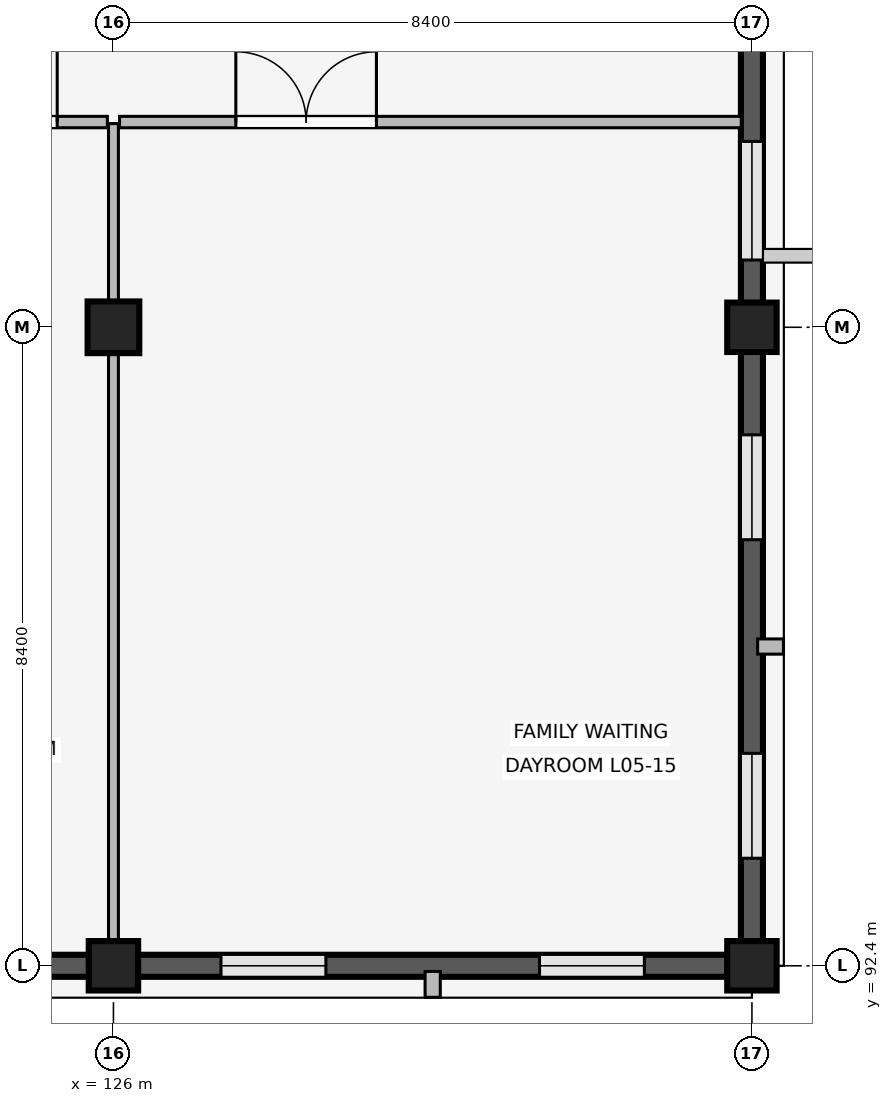
"""IFC4 building model, lengths in metres.
Left out: names, types, materials, properties, quantities, classifications, styles, units other than length and angle.
Written with IfcOpenShell. Run it as: python <this file> out.ifc"""

import sys

from ifc_helpers import new_model, si_unit, direction, frame, frame_2d, origin, origin_2d, place, context, subcontext, project, spatial, rectangle, extrude, element, fill, save


model = new_model("IFC4")
c1 = context("Model", 3, precision=1e-05, world=origin(), true_north=direction((0.0, 1.0)))
c2 = subcontext(c1, "Body", "Model", "MODEL_VIEW")
j1 = project(units=[si_unit("LENGTHUNIT", "METRE"), si_unit("PLANEANGLEUNIT", "RADIAN")], contexts=[c1])
p1 = place(None, origin())
s1 = spatial("IfcSite", under=j1, at=p1, CompositionType="ELEMENT")
p2 = place(p1, origin())
s2 = spatial("IfcBuilding", under=s1, at=p2, CompositionType="ELEMENT")
p3 = place(p2, frame((0.0, 0.0, 20.4)))
s3 = spatial("IfcBuildingStorey", under=s2, at=p3, CompositionType="ELEMENT", Elevation=20.4)
p4 = place(p3, frame((126.0, 92.4, 0.0), z_axis=(0.0, 0.0, 1.0), x_axis=(1.0, 0.0, 0.0)))
e1 = element("IfcColumn", 1, at=p4, inside=s3, PredefinedType="COLUMN", context=c2, shape_type="SweptSolid", body=[
    extrude(rectangle(XDim=0.65, YDim=0.65, at=origin_2d()), origin(), (0.0, 0.0, 1.0), 4.2),
])
p5 = place(p3, frame((126.0, 100.8, 0.0), z_axis=(0.0, 0.0, 1.0), x_axis=(1.0, 0.0, 0.0)))
e2 = element("IfcColumn", 2, at=p5, inside=s3, PredefinedType="COLUMN", context=c2, shape_type="SweptSolid", body=[
    extrude(rectangle(XDim=0.68, YDim=0.68, at=origin_2d()), origin(), (0.0, 0.0, 1.0), 4.2),
])
for number, where, z_axis, x_axis in (
    (3, (134.4, 92.4, 0.0), (0.0, 0.0, 1.0), (1.0, 0.0, 0.0)),
    (4, (134.4, 100.8, 0.0), (0.0, 0.0, 1.0), (1.0, 0.0, 0.0)),
):
    element("IfcColumn", number, at=place(p3, frame(where, z_axis=z_axis, x_axis=x_axis)), inside=s3, PredefinedType="COLUMN", context=c2, shape_type="SweptSolid", body=[
        extrude(rectangle(XDim=0.65, YDim=0.65, at=origin_2d()), origin(), (0.0, 0.0, 1.0), 4.2),
    ])
p6 = place(p3, frame((125.68, 92.4, 0.0), z_axis=(0.0, 0.0, 1.0), x_axis=(-1.0, 0.0, 0.0)))
e5 = element("IfcWall", 5, at=p6, inside=s3, PredefinedType="SOLIDWALL", context=c2, shape_type="SweptSolid", body=[
    extrude(rectangle(XDim=7.76, YDim=0.29, at=frame_2d((3.88, 0.0))), origin(), (0.0, 0.0, 1.0), 3.34),
])
p7 = place(p6, frame((0.945, 0.0, 0.85)))
e6 = element("IfcOpeningElement", 6, at=p7, cuts=e5, PredefinedType="OPENING", context=c2, shape_type="SweptSolid", body=[
    extrude(rectangle(XDim=1.68, YDim=2.05, at=frame_2d((0.84, 1.025))), frame((0.0, 0.155, 0.0), z_axis=(0.0, -1.0, 0.0), x_axis=(1.0, 0.0, 0.0)), (0.0, 0.0, 1.0), 0.31),
])
p8 = place(p6, frame((5.135, 0.0, 0.85)))
e7 = element("IfcOpeningElement", 7, at=p8, cuts=e5, PredefinedType="OPENING", context=c2, shape_type="SweptSolid", body=[
    extrude(rectangle(XDim=1.68, YDim=2.05, at=frame_2d((0.84, 1.025))), frame((0.0, 0.155, 0.0), z_axis=(0.0, -1.0, 0.0), x_axis=(1.0, 0.0, 0.0)), (0.0, 0.0, 1.0), 0.31),
])
p9 = place(p3, frame((134.08, 92.4, 0.0), z_axis=(0.0, 0.0, 1.0), x_axis=(-1.0, 0.0, 0.0)))
e8 = element("IfcWall", 8, at=p9, inside=s3, PredefinedType="SOLIDWALL", context=c2, shape_type="SweptSolid", body=[
    extrude(rectangle(XDim=7.76, YDim=0.29, at=frame_2d((3.88, 0.0))), origin(), (0.0, 0.0, 1.0), 3.34),
])
p10 = place(p9, frame((1.095, 0.0, 0.85)))
e9 = element("IfcOpeningElement", 9, at=p10, cuts=e8, PredefinedType="OPENING", context=c2, shape_type="SweptSolid", body=[
    extrude(rectangle(XDim=1.38, YDim=1.5, at=frame_2d((0.69, 0.75))), frame((0.0, 0.155, 0.0), z_axis=(0.0, -1.0, 0.0), x_axis=(1.0, 0.0, 0.0)), (0.0, 0.0, 1.0), 0.31),
])
p11 = place(p9, frame((5.285, 0.0, 0.85)))
e10 = element("IfcOpeningElement", 10, at=p11, cuts=e8, PredefinedType="OPENING", context=c2, shape_type="SweptSolid", body=[
    extrude(rectangle(XDim=1.38, YDim=1.5, at=frame_2d((0.69, 0.75))), frame((0.0, 0.155, 0.0), z_axis=(0.0, -1.0, 0.0), x_axis=(1.0, 0.0, 0.0)), (0.0, 0.0, 1.0), 0.31),
])
p12 = place(p3, frame((130.2, 92.325, 0.0), z_axis=(0.0, 0.0, 1.0), x_axis=(0.0, -1.0, 0.0)))
e11 = element("IfcWall", 11, at=p12, inside=s3, PredefinedType="ELEMENTEDWALL", context=c2, shape_type="SweptSolid", body=[
    extrude(rectangle(XDim=0.34, YDim=0.2, at=frame_2d((0.17, 0.0))), origin(), (0.0, 0.0, 1.0), 3.32),
])
p13 = place(p3, frame((134.4, 100.48, 0.0), z_axis=(0.0, 0.0, 1.0), x_axis=(0.0, -1.0, 0.0)))
e12 = element("IfcWall", 12, at=p13, inside=s3, PredefinedType="SOLIDWALL", context=c2, shape_type="SweptSolid", body=[
    extrude(rectangle(XDim=7.76, YDim=0.29, at=frame_2d((3.88, 0.0))), origin(), (0.0, 0.0, 1.0), 3.34),
])
p14 = place(p13, frame((1.095, 0.0, 0.85)))
e13 = element("IfcOpeningElement", 13, at=p14, cuts=e12, PredefinedType="OPENING", context=c2, shape_type="SweptSolid", body=[
    extrude(rectangle(XDim=1.38, YDim=1.5, at=frame_2d((0.69, 0.75))), frame((0.0, 0.155, 0.0), z_axis=(0.0, -1.0, 0.0), x_axis=(1.0, 0.0, 0.0)), (0.0, 0.0, 1.0), 0.31),
])
p15 = place(p13, frame((5.285, 0.0, 0.85)))
e14 = element("IfcOpeningElement", 14, at=p15, cuts=e12, PredefinedType="OPENING", context=c2, shape_type="SweptSolid", body=[
    extrude(rectangle(XDim=1.38, YDim=1.5, at=frame_2d((0.69, 0.75))), frame((0.0, 0.155, 0.0), z_axis=(0.0, -1.0, 0.0), x_axis=(1.0, 0.0, 0.0)), (0.0, 0.0, 1.0), 0.31),
])
p16 = place(p3, frame((134.475, 96.6, 0.0), z_axis=(0.0, 0.0, 1.0), x_axis=(1.0, 0.0, 0.0)))
e15 = element("IfcWall", 15, at=p16, inside=s3, PredefinedType="ELEMENTEDWALL", context=c2, shape_type="SweptSolid", body=[
    extrude(rectangle(XDim=0.34, YDim=0.2, at=frame_2d((0.17, 0.0))), origin(), (0.0, 0.0, 1.0), 3.32),
])
p17 = place(p3, frame((134.4, 108.88, 0.0), z_axis=(0.0, 0.0, 1.0), x_axis=(0.0, -1.0, 0.0)))
e16 = element("IfcWall", 16, at=p17, inside=s3, PredefinedType="SOLIDWALL", context=c2, shape_type="SweptSolid", body=[
    extrude(rectangle(XDim=7.76, YDim=0.29, at=frame_2d((3.88, 0.0))), origin(), (0.0, 0.0, 1.0), 3.34),
])
p18 = place(p17, frame((0.565, 0.0, 0.85)))
e17 = element("IfcOpeningElement", 17, at=p18, cuts=e16, PredefinedType="OPENING", context=c2, shape_type="SweptSolid", body=[
    extrude(rectangle(XDim=1.56, YDim=1.7, at=frame_2d((0.78, 0.85))), frame((0.0, 0.155, 0.0), z_axis=(0.0, -1.0, 0.0), x_axis=(1.0, 0.0, 0.0)), (0.0, 0.0, 1.0), 0.31),
])
p19 = place(p17, frame((5.635, 0.0, 0.85)))
e18 = element("IfcOpeningElement", 18, at=p19, cuts=e16, PredefinedType="OPENING", context=c2, shape_type="SweptSolid", body=[
    extrude(rectangle(XDim=1.56, YDim=1.7, at=frame_2d((0.78, 0.85))), frame((0.0, 0.155, 0.0), z_axis=(0.0, -1.0, 0.0), x_axis=(1.0, 0.0, 0.0)), (0.0, 0.0, 1.0), 0.31),
])
p20 = place(p3, frame((117.68, 103.5, 0.0), z_axis=(0.0, 0.0, 1.0), x_axis=(1.0, 0.0, 0.0)))
e19 = element("IfcWall", 19, at=p20, inside=s3, PredefinedType="PARTITIONING", context=c2, shape_type="SweptSolid", body=[
    extrude(rectangle(XDim=8.24, YDim=0.15, at=frame_2d((4.12, 0.0))), origin(), (0.0, 0.0, 1.0), 3.32),
])
p21 = place(p20, frame((2.53, 0.0, 0.0)))
e20 = element("IfcOpeningElement", 20, at=p21, cuts=e19, PredefinedType="OPENING", context=c2, shape_type="SweptSolid", body=[
    extrude(rectangle(XDim=1.35, YDim=2.25, at=frame_2d((0.675, 1.125))), frame((0.0, 0.085, 0.0), z_axis=(0.0, -1.0, 0.0), x_axis=(1.0, 0.0, 0.0)), (0.0, 0.0, 1.0), 0.17),
])
p22 = place(p20, frame((6.23, 0.0, 0.0)))
e21 = element("IfcOpeningElement", 21, at=p22, cuts=e19, PredefinedType="OPENING", context=c2, shape_type="SweptSolid", body=[
    extrude(rectangle(XDim=1.35, YDim=2.25, at=frame_2d((0.675, 1.125))), frame((0.0, 0.085, 0.0), z_axis=(0.0, -1.0, 0.0), x_axis=(1.0, 0.0, 0.0)), (0.0, 0.0, 1.0), 0.17),
])
p23 = place(p3, frame((126.0, 92.54, 0.0), z_axis=(0.0, 0.0, 1.0), x_axis=(0.0, 1.0, 0.0)))
e22 = element("IfcWall", 22, at=p23, inside=s3, PredefinedType="PARTITIONING", context=c2, shape_type="SweptSolid", body=[
    extrude(rectangle(XDim=10.94, YDim=0.13, at=frame_2d((5.47, 0.0))), origin(), (0.0, 0.0, 1.0), 3.32),
])
p24 = place(p3, frame((126.08, 103.5, 0.0), z_axis=(0.0, 0.0, 1.0), x_axis=(1.0, 0.0, 0.0)))
e23 = element("IfcWall", 23, at=p24, inside=s3, PredefinedType="PARTITIONING", context=c2, shape_type="SweptSolid", body=[
    extrude(rectangle(XDim=8.18, YDim=0.15, at=frame_2d((4.09, 0.0))), origin(), (0.0, 0.0, 1.0), 3.32),
])
p25 = place(p24, frame((1.53, 0.0, 0.0)))
e24 = element("IfcOpeningElement", 24, at=p25, cuts=e23, PredefinedType="OPENING", context=c2, shape_type="SweptSolid", body=[
    extrude(rectangle(XDim=1.85, YDim=2.3, at=frame_2d((0.925, 1.15))), frame((0.0, 0.085, 0.0), z_axis=(0.0, -1.0, 0.0), x_axis=(1.0, 0.0, 0.0)), (0.0, 0.0, 1.0), 0.17),
])
p26 = place(p10, origin())
e25 = element("IfcWindow", 25, at=p26, inside=s3, PartitioningType="SINGLE_PANEL", PredefinedType="WINDOW", context=c2, shape_type="SweptSolid", body=[
    extrude(rectangle(XDim=1.38, YDim=1.5, at=frame_2d((0.69, 0.75))), frame((0.0, 0.03, 0.0), z_axis=(0.0, -1.0, 0.0), x_axis=(1.0, 0.0, 0.0)), (0.0, 0.0, 1.0), 0.06),
])
fill(e9, e25)
p27 = place(p11, origin())
e26 = element("IfcWindow", 26, at=p27, inside=s3, PartitioningType="SINGLE_PANEL", PredefinedType="WINDOW", context=c2, shape_type="SweptSolid", body=[
    extrude(rectangle(XDim=1.38, YDim=1.5, at=frame_2d((0.69, 0.75))), frame((0.0, 0.03, 0.0), z_axis=(0.0, -1.0, 0.0), x_axis=(1.0, 0.0, 0.0)), (0.0, 0.0, 1.0), 0.06),
])
fill(e10, e26)
p28 = place(p14, origin())
e27 = element("IfcWindow", 27, at=p28, inside=s3, PartitioningType="SINGLE_PANEL", PredefinedType="WINDOW", context=c2, shape_type="SweptSolid", body=[
    extrude(rectangle(XDim=1.38, YDim=1.5, at=frame_2d((0.69, 0.75))), frame((0.0, 0.03, 0.0), z_axis=(0.0, -1.0, 0.0), x_axis=(1.0, 0.0, 0.0)), (0.0, 0.0, 1.0), 0.06),
])
fill(e13, e27)
p29 = place(p15, origin())
e28 = element("IfcWindow", 28, at=p29, inside=s3, PartitioningType="SINGLE_PANEL", PredefinedType="WINDOW", context=c2, shape_type="SweptSolid", body=[
    extrude(rectangle(XDim=1.38, YDim=1.5, at=frame_2d((0.69, 0.75))), frame((0.0, 0.03, 0.0), z_axis=(0.0, -1.0, 0.0), x_axis=(1.0, 0.0, 0.0)), (0.0, 0.0, 1.0), 0.06),
])
fill(e14, e28)
p30 = place(p19, origin())
e29 = element("IfcWindow", 29, at=p30, inside=s3, PartitioningType="SINGLE_PANEL", PredefinedType="WINDOW", context=c2, shape_type="SweptSolid", body=[
    extrude(rectangle(XDim=1.56, YDim=1.7, at=frame_2d((0.78, 0.85))), frame((0.0, 0.03, 0.0), z_axis=(0.0, -1.0, 0.0), x_axis=(1.0, 0.0, 0.0)), (0.0, 0.0, 1.0), 0.06),
])
fill(e18, e29)
p31 = place(p22, origin())
e30 = element("IfcDoor", 30, at=p31, inside=s3, OperationType="SINGLE_SWING_RIGHT", PredefinedType="DOOR", context=c2, shape_type="SweptSolid", body=[
    extrude(rectangle(XDim=1.35, YDim=2.25, at=frame_2d((0.675, 1.125))), frame((0.0, 0.025, 0.0), z_axis=(0.0, -1.0, 0.0), x_axis=(1.0, 0.0, 0.0)), (0.0, 0.0, 1.0), 0.05),
])
fill(e21, e30)
p32 = place(p25, origin())
e31 = element("IfcDoor", 31, at=p32, inside=s3, OperationType="DOUBLE_SWING_LEFT", PredefinedType="DOOR", context=c2, shape_type="SweptSolid", body=[
    extrude(rectangle(XDim=1.85, YDim=2.3, at=frame_2d((0.925, 1.15))), frame((0.0, 0.025, 0.0), z_axis=(0.0, -1.0, 0.0), x_axis=(1.0, 0.0, 0.0)), (0.0, 0.0, 1.0), 0.05),
])
fill(e24, e31)
save(model, sys.argv[1])
